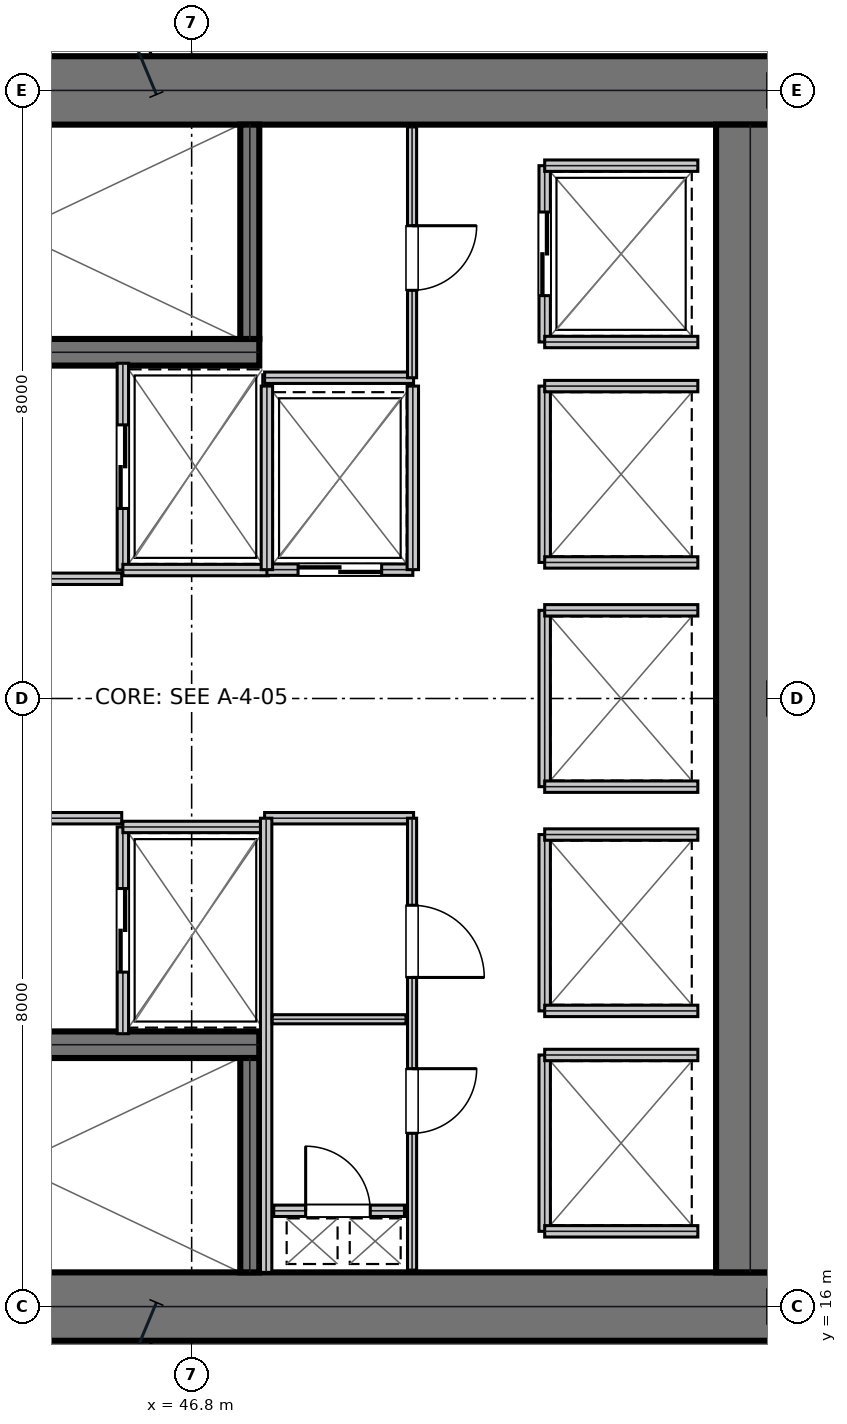
"""IFC4 building model, lengths in metres.
Left out: names, types, materials, properties, quantities, classifications, styles, units other than length and angle.
Written with IfcOpenShell. Run it as: python <this file> out.ifc"""

import sys

from ifc_helpers import new_model, si_unit, direction, frame, frame_2d, origin, place, context, subcontext, project, spatial, rectangle, extrude, element, fill, save


model = new_model("IFC4")
c1 = context("Model", 3, precision=1e-05, world=origin(), true_north=direction((0.0, 1.0)))
c2 = subcontext(c1, "Body", "Model", "MODEL_VIEW")
j1 = project(units=[si_unit("LENGTHUNIT", "METRE"), si_unit("PLANEANGLEUNIT", "RADIAN")], contexts=[c1])
p1 = place(None, origin())
s1 = spatial("IfcSite", under=j1, at=p1, CompositionType="ELEMENT")
p2 = place(p1, origin())
s2 = spatial("IfcBuilding", under=s1, at=p2, CompositionType="ELEMENT")
p3 = place(p2, frame((0.0, 0.0, 78.3)))
s3 = spatial("IfcBuildingStorey", under=s2, at=p3, CompositionType="ELEMENT", Elevation=78.3)
for number, where, z_axis, x_axis in (
    (1, (38.8, 32.0, 0.0), (0.0, 0.0, 1.0), (1.0, 0.0, 0.0)),
    (2, (38.8, 16.0, 0.0), (0.0, 0.0, 1.0), (1.0, 0.0, 0.0)),
):
    element("IfcWall", number, at=place(p3, frame(where, z_axis=z_axis, x_axis=x_axis)), inside=s3, PredefinedType="SHEAR", context=c2, shape_type="SweptSolid", body=[
        extrude(rectangle(XDim=16.0, YDim=0.9, at=frame_2d((8.0, 0.0))), origin(), (0.0, 0.0, 1.0), 3.81),
    ])
p4 = place(p3, frame((54.15, 16.45, 0.0), z_axis=(0.0, 0.0, 1.0), x_axis=(0.0, 1.0, 0.0)))
e3 = element("IfcWall", 3, at=p4, inside=s3, PredefinedType="SHEAR", context=c2, shape_type="SweptSolid", body=[
    extrude(rectangle(XDim=15.1, YDim=0.9, at=frame_2d((7.55, 0.0))), origin(), (0.0, 0.0, 1.0), 3.81),
])
p5 = place(p3, frame((39.98, 28.555, 0.0), z_axis=(0.0, 0.0, 1.0), x_axis=(1.0, 0.0, 0.0)))
e4 = element("IfcWall", 4, at=p5, inside=s3, PredefinedType="SHEAR", context=c2, shape_type="SweptSolid", body=[
    extrude(rectangle(XDim=7.71, YDim=0.35, at=frame_2d((3.855, 0.0))), origin(), (0.0, 0.0, 1.0), 3.81),
])
p6 = place(p5, frame((0.25, 0.0, 0.0)))
e5 = element("IfcOpeningElement", 5, at=p6, cuts=e4, PredefinedType="OPENING", context=c2, shape_type="SweptSolid", body=[
    extrude(rectangle(XDim=1.1, YDim=2.15, at=frame_2d((0.55, 1.075))), frame((0.0, 0.185, 0.0), z_axis=(0.0, -1.0, 0.0), x_axis=(1.0, 0.0, 0.0)), (0.0, 0.0, 1.0), 0.37),
])
p7 = place(p3, frame((39.98, 19.445, 0.0), z_axis=(0.0, 0.0, 1.0), x_axis=(1.0, 0.0, 0.0)))
e6 = element("IfcWall", 6, at=p7, inside=s3, PredefinedType="SHEAR", context=c2, shape_type="SweptSolid", body=[
    extrude(rectangle(XDim=7.71, YDim=0.35, at=frame_2d((3.855, 0.0))), origin(), (0.0, 0.0, 1.0), 3.81),
])
p8 = place(p7, frame((0.25, 0.0, 0.0)))
e7 = element("IfcOpeningElement", 7, at=p8, cuts=e6, PredefinedType="OPENING", context=c2, shape_type="SweptSolid", body=[
    extrude(rectangle(XDim=1.1, YDim=2.15, at=frame_2d((0.55, 1.075))), frame((0.0, 0.185, 0.0), z_axis=(0.0, -1.0, 0.0), x_axis=(1.0, 0.0, 0.0)), (0.0, 0.0, 1.0), 0.37),
])
for number, where, z_axis, x_axis in (
    (8, (47.565, 28.73, 0.0), (0.0, 0.0, 1.0), (0.0, 1.0, 0.0)),
    (9, (47.565, 16.45, 0.0), (0.0, 0.0, 1.0), (0.0, 1.0, 0.0)),
):
    element("IfcWall", number, at=place(p3, frame(where, z_axis=z_axis, x_axis=x_axis)), inside=s3, PredefinedType="SHEAR", context=c2, shape_type="SweptSolid", body=[
        extrude(rectangle(XDim=2.82, YDim=0.25, at=frame_2d((1.41, 0.0))), origin(), (0.0, 0.0, 1.0), 3.81),
    ])
p9 = place(p3, frame((39.98, 25.575, 0.0), z_axis=(0.0, 0.0, 1.0), x_axis=(1.0, 0.0, 0.0)))
e10 = element("IfcWall", 10, at=p9, inside=s3, PredefinedType="PARTITIONING", context=c2, shape_type="SweptSolid", body=[
    extrude(rectangle(XDim=5.9, YDim=0.15, at=frame_2d((2.95, 0.0))), origin(), (0.0, 0.0, 1.0), 3.81),
])
p10 = place(p9, frame((2.35, 0.0, 0.0)))
e11 = element("IfcOpeningElement", 11, at=p10, cuts=e10, PredefinedType="OPENING", context=c2, shape_type="SweptSolid", body=[
    extrude(rectangle(XDim=1.05, YDim=2.15, at=frame_2d((0.525, 1.075))), frame((0.0, 0.085, 0.0), z_axis=(0.0, -1.0, 0.0), x_axis=(1.0, 0.0, 0.0)), (0.0, 0.0, 1.0), 0.17),
])
p11 = place(p3, frame((39.98, 22.425, 0.0), z_axis=(0.0, 0.0, 1.0), x_axis=(1.0, 0.0, 0.0)))
e12 = element("IfcWall", 12, at=p11, inside=s3, PredefinedType="PARTITIONING", context=c2, shape_type="SweptSolid", body=[
    extrude(rectangle(XDim=5.9, YDim=0.15, at=frame_2d((2.95, 0.0))), origin(), (0.0, 0.0, 1.0), 3.81),
])
p12 = place(p11, frame((2.35, 0.0, 0.0)))
e13 = element("IfcOpeningElement", 13, at=p12, cuts=e12, PredefinedType="OPENING", context=c2, shape_type="SweptSolid", body=[
    extrude(rectangle(XDim=1.05, YDim=2.15, at=frame_2d((0.525, 1.075))), frame((0.0, 0.085, 0.0), z_axis=(0.0, -1.0, 0.0), x_axis=(1.0, 0.0, 0.0)), (0.0, 0.0, 1.0), 0.17),
])
p13 = place(p3, frame((45.895, 25.69, 0.0), z_axis=(0.0, 0.0, 1.0), x_axis=(0.0, 1.0, 0.0)))
e14 = element("IfcWall", 14, at=p13, inside=s3, PredefinedType="PARTITIONING", context=c2, shape_type="SweptSolid", body=[
    extrude(rectangle(XDim=2.72, YDim=0.15, at=frame_2d((1.36, 0.0))), origin(), (0.0, 0.0, 1.0), 3.81),
])
p14 = place(p13, frame((0.81, 0.0, 0.0)))
e15 = element("IfcOpeningElement", 15, at=p14, cuts=e14, PredefinedType="OPENING", context=c2, shape_type="SweptSolid", body=[
    extrude(rectangle(XDim=1.1, YDim=2.15, at=frame_2d((0.55, 1.075))), frame((0.0, 0.085, 0.0), z_axis=(0.0, -1.0, 0.0), x_axis=(1.0, 0.0, 0.0)), (0.0, 0.0, 1.0), 0.17),
])
p15 = place(p3, frame((45.895, 25.69, 0.0), z_axis=(0.0, 0.0, 1.0), x_axis=(1.0, 0.0, 0.0)))
e16 = element("IfcWall", 16, at=p15, inside=s3, PredefinedType="PARTITIONING", context=c2, shape_type="SweptSolid", body=[
    extrude(rectangle(XDim=1.915, YDim=0.15, at=frame_2d((0.958, 0.0))), origin(), (0.0, 0.0, 1.0), 3.81),
])
p16 = place(p3, frame((45.895, 19.59, 0.0), z_axis=(0.0, 0.0, 1.0), x_axis=(0.0, 1.0, 0.0)))
e17 = element("IfcWall", 17, at=p16, inside=s3, PredefinedType="PARTITIONING", context=c2, shape_type="SweptSolid", body=[
    extrude(rectangle(XDim=2.72, YDim=0.15, at=frame_2d((1.36, 0.0))), origin(), (0.0, 0.0, 1.0), 3.81),
])
p17 = place(p16, frame((0.81, 0.0, 0.0)))
e18 = element("IfcOpeningElement", 18, at=p17, cuts=e17, PredefinedType="OPENING", context=c2, shape_type="SweptSolid", body=[
    extrude(rectangle(XDim=1.1, YDim=2.15, at=frame_2d((0.55, 1.075))), frame((0.0, 0.085, 0.0), z_axis=(0.0, -1.0, 0.0), x_axis=(1.0, 0.0, 0.0)), (0.0, 0.0, 1.0), 0.17),
])
p18 = place(p3, frame((45.895, 22.31, 0.0), z_axis=(0.0, 0.0, 1.0), x_axis=(1.0, 0.0, 0.0)))
e19 = element("IfcWall", 19, at=p18, inside=s3, PredefinedType="PARTITIONING", context=c2, shape_type="SweptSolid", body=[
    extrude(rectangle(XDim=1.915, YDim=0.15, at=frame_2d((0.958, 0.0))), origin(), (0.0, 0.0, 1.0), 3.81),
])
p19 = place(p3, frame((47.79, 25.695, 0.0), z_axis=(0.0, 0.0, 1.0), x_axis=(1.0, 0.0, 0.0)))
e20 = element("IfcWall", 20, at=p19, inside=s3, PredefinedType="PARTITIONING", context=c2, shape_type="SweptSolid", body=[
    extrude(rectangle(XDim=1.92, YDim=0.15, at=frame_2d((0.96, 0.0))), origin(), (0.0, 0.0, 1.0), 3.81),
])
p20 = place(p19, frame((0.41, 0.0, 0.0)))
e21 = element("IfcOpeningElement", 21, at=p20, cuts=e20, PredefinedType="OPENING", context=c2, shape_type="SweptSolid", body=[
    extrude(rectangle(XDim=1.1, YDim=2.15, at=frame_2d((0.55, 1.075))), frame((0.0, 0.085, 0.0), z_axis=(0.0, -1.0, 0.0), x_axis=(1.0, 0.0, 0.0)), (0.0, 0.0, 1.0), 0.17),
])
for number, where, z_axis, x_axis in (
    (22, (47.79, 25.695, 0.0), (0.0, 0.0, 1.0), (0.0, 1.0, 0.0)),
    (23, (49.71, 25.695, 0.0), (0.0, 0.0, 1.0), (0.0, 1.0, 0.0)),
):
    element("IfcWall", number, at=place(p3, frame(where, z_axis=z_axis, x_axis=x_axis)), inside=s3, PredefinedType="PARTITIONING", context=c2, shape_type="SweptSolid", body=[
        extrude(rectangle(XDim=2.415, YDim=0.15, at=frame_2d((1.208, 0.0))), origin(), (0.0, 0.0, 1.0), 3.81),
    ])
p21 = place(p3, frame((51.445, 28.69, 0.0), z_axis=(0.0, 0.0, 1.0), x_axis=(0.0, 1.0, 0.0)))
e24 = element("IfcWall", 24, at=p21, inside=s3, PredefinedType="PARTITIONING", context=c2, shape_type="SweptSolid", body=[
    extrude(rectangle(XDim=2.32, YDim=0.15, at=frame_2d((1.16, 0.0))), origin(), (0.0, 0.0, 1.0), 3.81),
])
p22 = place(p21, frame((0.61, 0.0, 0.0)))
e25 = element("IfcOpeningElement", 25, at=p22, cuts=e24, PredefinedType="OPENING", context=c2, shape_type="SweptSolid", body=[
    extrude(rectangle(XDim=1.1, YDim=2.15, at=frame_2d((0.55, 1.075))), frame((0.0, 0.085, 0.0), z_axis=(0.0, -1.0, 0.0), x_axis=(1.0, 0.0, 0.0)), (0.0, 0.0, 1.0), 0.17),
])
for number, where, z_axis, x_axis in (
    (26, (51.445, 28.69, 0.0), (0.0, 0.0, 1.0), (1.0, 0.0, 0.0)),
    (27, (51.445, 31.01, 0.0), (0.0, 0.0, 1.0), (1.0, 0.0, 0.0)),
):
    element("IfcWall", number, at=place(p3, frame(where, z_axis=z_axis, x_axis=x_axis)), inside=s3, PredefinedType="PARTITIONING", context=c2, shape_type="SweptSolid", body=[
        extrude(rectangle(XDim=2.015, YDim=0.15, at=frame_2d((1.007, 0.0))), origin(), (0.0, 0.0, 1.0), 3.81),
    ])
p23 = place(p3, frame((51.445, 25.79, 0.0), z_axis=(0.0, 0.0, 1.0), x_axis=(0.0, 1.0, 0.0)))
e28 = element("IfcWall", 28, at=p23, inside=s3, PredefinedType="PARTITIONING", context=c2, shape_type="SweptSolid", body=[
    extrude(rectangle(XDim=2.32, YDim=0.15, at=frame_2d((1.16, 0.0))), origin(), (0.0, 0.0, 1.0), 3.81),
])
for number, where, z_axis, x_axis in (
    (29, (51.445, 25.79, 0.0), (0.0, 0.0, 1.0), (1.0, 0.0, 0.0)),
    (30, (51.445, 28.11, 0.0), (0.0, 0.0, 1.0), (1.0, 0.0, 0.0)),
):
    element("IfcWall", number, at=place(p3, frame(where, z_axis=z_axis, x_axis=x_axis)), inside=s3, PredefinedType="PARTITIONING", context=c2, shape_type="SweptSolid", body=[
        extrude(rectangle(XDim=2.015, YDim=0.15, at=frame_2d((1.007, 0.0))), origin(), (0.0, 0.0, 1.0), 3.81),
    ])
p24 = place(p3, frame((51.445, 19.89, 0.0), z_axis=(0.0, 0.0, 1.0), x_axis=(0.0, 1.0, 0.0)))
e31 = element("IfcWall", 31, at=p24, inside=s3, PredefinedType="PARTITIONING", context=c2, shape_type="SweptSolid", body=[
    extrude(rectangle(XDim=2.32, YDim=0.15, at=frame_2d((1.16, 0.0))), origin(), (0.0, 0.0, 1.0), 3.81),
])
for number, where, z_axis, x_axis in (
    (32, (51.445, 19.89, 0.0), (0.0, 0.0, 1.0), (1.0, 0.0, 0.0)),
    (33, (51.445, 22.21, 0.0), (0.0, 0.0, 1.0), (1.0, 0.0, 0.0)),
):
    element("IfcWall", number, at=place(p3, frame(where, z_axis=z_axis, x_axis=x_axis)), inside=s3, PredefinedType="PARTITIONING", context=c2, shape_type="SweptSolid", body=[
        extrude(rectangle(XDim=2.015, YDim=0.15, at=frame_2d((1.007, 0.0))), origin(), (0.0, 0.0, 1.0), 3.81),
    ])
p25 = place(p3, frame((51.445, 22.84, 0.0), z_axis=(0.0, 0.0, 1.0), x_axis=(0.0, 1.0, 0.0)))
e34 = element("IfcWall", 34, at=p25, inside=s3, PredefinedType="PARTITIONING", context=c2, shape_type="SweptSolid", body=[
    extrude(rectangle(XDim=2.32, YDim=0.15, at=frame_2d((1.16, 0.0))), origin(), (0.0, 0.0, 1.0), 3.81),
])
for number, where, z_axis, x_axis in (
    (35, (51.445, 22.84, 0.0), (0.0, 0.0, 1.0), (1.0, 0.0, 0.0)),
    (36, (51.445, 25.16, 0.0), (0.0, 0.0, 1.0), (1.0, 0.0, 0.0)),
):
    element("IfcWall", number, at=place(p3, frame(where, z_axis=z_axis, x_axis=x_axis)), inside=s3, PredefinedType="PARTITIONING", context=c2, shape_type="SweptSolid", body=[
        extrude(rectangle(XDim=2.015, YDim=0.15, at=frame_2d((1.007, 0.0))), origin(), (0.0, 0.0, 1.0), 3.81),
    ])
p26 = place(p3, frame((51.445, 16.99, 0.0), z_axis=(0.0, 0.0, 1.0), x_axis=(0.0, 1.0, 0.0)))
e37 = element("IfcWall", 37, at=p26, inside=s3, PredefinedType="PARTITIONING", context=c2, shape_type="SweptSolid", body=[
    extrude(rectangle(XDim=2.32, YDim=0.15, at=frame_2d((1.16, 0.0))), origin(), (0.0, 0.0, 1.0), 3.81),
])
for number, where, z_axis, x_axis in (
    (38, (51.445, 16.99, 0.0), (0.0, 0.0, 1.0), (1.0, 0.0, 0.0)),
    (39, (51.445, 19.31, 0.0), (0.0, 0.0, 1.0), (1.0, 0.0, 0.0)),
):
    element("IfcWall", number, at=place(p3, frame(where, z_axis=z_axis, x_axis=x_axis)), inside=s3, PredefinedType="PARTITIONING", context=c2, shape_type="SweptSolid", body=[
        extrude(rectangle(XDim=2.015, YDim=0.15, at=frame_2d((1.007, 0.0))), origin(), (0.0, 0.0, 1.0), 3.81),
    ])
p27 = place(p3, frame((47.88, 17.26, 0.0), z_axis=(0.0, 0.0, 1.0), x_axis=(1.0, 0.0, 0.0)))
e40 = element("IfcWall", 40, at=p27, inside=s3, PredefinedType="PARTITIONING", context=c2, shape_type="SweptSolid", body=[
    extrude(rectangle(XDim=1.72, YDim=0.15, at=frame_2d((0.86, 0.0))), origin(), (0.0, 0.0, 1.0), 3.81),
])
p28 = place(p27, frame((0.42, 0.0, 0.0)))
e41 = element("IfcOpeningElement", 41, at=p28, cuts=e40, PredefinedType="OPENING", context=c2, shape_type="SweptSolid", body=[
    extrude(rectangle(XDim=0.85, YDim=2.15, at=frame_2d((0.425, 1.075))), frame((0.0, 0.085, 0.0), z_axis=(0.0, -1.0, 0.0), x_axis=(1.0, 0.0, 0.0)), (0.0, 0.0, 1.0), 0.17),
])
p29 = place(p3, frame((47.76, 22.425, 0.0), z_axis=(0.0, 0.0, 1.0), x_axis=(1.0, 0.0, 0.0)))
e42 = element("IfcWall", 42, at=p29, inside=s3, PredefinedType="PARTITIONING", context=c2, shape_type="SweptSolid", body=[
    extrude(rectangle(XDim=1.96, YDim=0.15, at=frame_2d((0.98, 0.0))), origin(), (0.0, 0.0, 1.0), 3.81),
])
p30 = place(p3, frame((47.78, 16.45, 0.0), z_axis=(0.0, 0.0, 1.0), x_axis=(0.0, 1.0, 0.0)))
e43 = element("IfcWall", 43, at=p30, inside=s3, PredefinedType="PARTITIONING", context=c2, shape_type="SweptSolid", body=[
    extrude(rectangle(XDim=5.975, YDim=0.15, at=frame_2d((2.988, 0.0))), origin(), (0.0, 0.0, 1.0), 3.81),
])
p31 = place(p3, frame((47.86, 19.78, 0.0), z_axis=(0.0, 0.0, 1.0), x_axis=(1.0, 0.0, 0.0)))
e44 = element("IfcWall", 44, at=p31, inside=s3, PredefinedType="PARTITIONING", context=c2, shape_type="SweptSolid", body=[
    extrude(rectangle(XDim=1.76, YDim=0.12, at=frame_2d((0.88, 0.0))), origin(), (0.0, 0.0, 1.0), 3.81),
])
p32 = place(p3, frame((49.7, 16.48, 0.0), z_axis=(0.0, 0.0, 1.0), x_axis=(0.0, 1.0, 0.0)))
e45 = element("IfcWall", 45, at=p32, inside=s3, PredefinedType="PARTITIONING", context=c2, shape_type="SweptSolid", body=[
    extrude(rectangle(XDim=5.945, YDim=0.12, at=frame_2d((2.973, 0.0))), origin(), (0.0, 0.0, 1.0), 3.81),
])
p33 = place(p32, frame((1.8, 0.0, 0.0)))
e46 = element("IfcOpeningElement", 46, at=p33, cuts=e45, PredefinedType="OPENING", context=c2, shape_type="SweptSolid", body=[
    extrude(rectangle(XDim=0.85, YDim=2.15, at=frame_2d((0.425, 1.075))), frame((0.0, 0.07, 0.0), z_axis=(0.0, -1.0, 0.0), x_axis=(1.0, 0.0, 0.0)), (0.0, 0.0, 1.0), 0.14),
])
p34 = place(p32, frame((3.85, 0.0, 0.0)))
e47 = element("IfcOpeningElement", 47, at=p34, cuts=e45, PredefinedType="OPENING", context=c2, shape_type="SweptSolid", body=[
    extrude(rectangle(XDim=0.95, YDim=2.15, at=frame_2d((0.475, 1.075))), frame((0.0, 0.07, 0.0), z_axis=(0.0, -1.0, 0.0), x_axis=(1.0, 0.0, 0.0)), (0.0, 0.0, 1.0), 0.14),
])
p35 = place(p3, frame((47.76, 28.22, 0.0), z_axis=(0.0, 0.0, 1.0), x_axis=(1.0, 0.0, 0.0)))
e48 = element("IfcWall", 48, at=p35, inside=s3, PredefinedType="PARTITIONING", context=c2, shape_type="SweptSolid", body=[
    extrude(rectangle(XDim=1.96, YDim=0.15, at=frame_2d((0.98, 0.0))), origin(), (0.0, 0.0, 1.0), 3.81),
])
p36 = place(p3, frame((49.7, 28.22, 0.0), z_axis=(0.0, 0.0, 1.0), x_axis=(0.0, 1.0, 0.0)))
e49 = element("IfcWall", 49, at=p36, inside=s3, PredefinedType="PARTITIONING", context=c2, shape_type="SweptSolid", body=[
    extrude(rectangle(XDim=3.3, YDim=0.12, at=frame_2d((1.65, 0.0))), origin(), (0.0, 0.0, 1.0), 3.81),
])
p37 = place(p36, frame((1.15, 0.0, 0.0)))
e50 = element("IfcOpeningElement", 50, at=p37, cuts=e49, PredefinedType="OPENING", context=c2, shape_type="SweptSolid", body=[
    extrude(rectangle(XDim=0.85, YDim=2.15, at=frame_2d((0.425, 1.075))), frame((0.0, 0.07, 0.0), z_axis=(0.0, -1.0, 0.0), x_axis=(1.0, 0.0, 0.0)), (0.0, 0.0, 1.0), 0.14),
])
p38 = place(p14, frame((1.1, 0.0, 0.0), z_axis=(0.0, 0.0, 1.0), x_axis=(-1.0, 0.0, 0.0)))
e51 = element("IfcDoor", 51, at=p38, inside=s3, OperationType="DOUBLE_DOOR_SLIDING", PredefinedType="DOOR", context=c2, shape_type="SweptSolid", body=[
    extrude(rectangle(XDim=1.1, YDim=2.15, at=frame_2d((0.55, 1.075))), frame((0.0, 0.025, 0.0), z_axis=(0.0, -1.0, 0.0), x_axis=(1.0, 0.0, 0.0)), (0.0, 0.0, 1.0), 0.05),
])
fill(e15, e51)
p39 = place(p17, frame((1.1, 0.0, 0.0), z_axis=(0.0, 0.0, 1.0), x_axis=(-1.0, 0.0, 0.0)))
e52 = element("IfcDoor", 52, at=p39, inside=s3, OperationType="DOUBLE_DOOR_SLIDING", PredefinedType="DOOR", context=c2, shape_type="SweptSolid", body=[
    extrude(rectangle(XDim=1.1, YDim=2.15, at=frame_2d((0.55, 1.075))), frame((0.0, 0.025, 0.0), z_axis=(0.0, -1.0, 0.0), x_axis=(1.0, 0.0, 0.0)), (0.0, 0.0, 1.0), 0.05),
])
fill(e18, e52)
p40 = place(p20, frame((1.1, 0.0, 0.0), z_axis=(0.0, 0.0, 1.0), x_axis=(-1.0, 0.0, 0.0)))
e53 = element("IfcDoor", 53, at=p40, inside=s3, OperationType="DOUBLE_DOOR_SLIDING", PredefinedType="DOOR", context=c2, shape_type="SweptSolid", body=[
    extrude(rectangle(XDim=1.1, YDim=2.15, at=frame_2d((0.55, 1.075))), frame((0.0, 0.025, 0.0), z_axis=(0.0, -1.0, 0.0), x_axis=(1.0, 0.0, 0.0)), (0.0, 0.0, 1.0), 0.05),
])
fill(e21, e53)
p41 = place(p22, frame((1.1, 0.0, 0.0), z_axis=(0.0, 0.0, 1.0), x_axis=(-1.0, 0.0, 0.0)))
e54 = element("IfcDoor", 54, at=p41, inside=s3, OperationType="DOUBLE_DOOR_SLIDING", PredefinedType="DOOR", context=c2, shape_type="SweptSolid", body=[
    extrude(rectangle(XDim=1.1, YDim=2.15, at=frame_2d((0.55, 1.075))), frame((0.0, 0.025, 0.0), z_axis=(0.0, -1.0, 0.0), x_axis=(1.0, 0.0, 0.0)), (0.0, 0.0, 1.0), 0.05),
])
fill(e25, e54)
p42 = place(p28, origin())
e55 = element("IfcDoor", 55, at=p42, inside=s3, OperationType="SINGLE_SWING_LEFT", PredefinedType="TRAPDOOR", context=c2, shape_type="SweptSolid", body=[
    extrude(rectangle(XDim=0.85, YDim=2.15, at=frame_2d((0.425, 1.075))), frame((0.0, 0.025, 0.0), z_axis=(0.0, -1.0, 0.0), x_axis=(1.0, 0.0, 0.0)), (0.0, 0.0, 1.0), 0.05),
])
fill(e41, e55)
p43 = place(p33, frame((0.85, 0.0, 0.0), z_axis=(0.0, 0.0, 1.0), x_axis=(-1.0, 0.0, 0.0)))
e56 = element("IfcDoor", 56, at=p43, inside=s3, OperationType="SINGLE_SWING_LEFT", PredefinedType="DOOR", context=c2, shape_type="SweptSolid", body=[
    extrude(rectangle(XDim=0.85, YDim=2.15, at=frame_2d((0.425, 1.075))), frame((0.0, 0.025, 0.0), z_axis=(0.0, -1.0, 0.0), x_axis=(1.0, 0.0, 0.0)), (0.0, 0.0, 1.0), 0.05),
])
fill(e46, e56)
p44 = place(p34, frame((0.95, 0.0, 0.0), z_axis=(0.0, 0.0, 1.0), x_axis=(-1.0, 0.0, 0.0)))
e57 = element("IfcDoor", 57, at=p44, inside=s3, OperationType="SINGLE_SWING_RIGHT", PredefinedType="DOOR", context=c2, shape_type="SweptSolid", body=[
    extrude(rectangle(XDim=0.95, YDim=2.15, at=frame_2d((0.475, 1.075))), frame((0.0, 0.025, 0.0), z_axis=(0.0, -1.0, 0.0), x_axis=(1.0, 0.0, 0.0)), (0.0, 0.0, 1.0), 0.05),
])
fill(e47, e57)
p45 = place(p37, frame((0.85, 0.0, 0.0), z_axis=(0.0, 0.0, 1.0), x_axis=(-1.0, 0.0, 0.0)))
e58 = element("IfcDoor", 58, at=p45, inside=s3, OperationType="SINGLE_SWING_LEFT", PredefinedType="DOOR", context=c2, shape_type="SweptSolid", body=[
    extrude(rectangle(XDim=0.85, YDim=2.15, at=frame_2d((0.425, 1.075))), frame((0.0, 0.025, 0.0), z_axis=(0.0, -1.0, 0.0), x_axis=(1.0, 0.0, 0.0)), (0.0, 0.0, 1.0), 0.05),
])
fill(e50, e58)
save(model, sys.argv[1])
